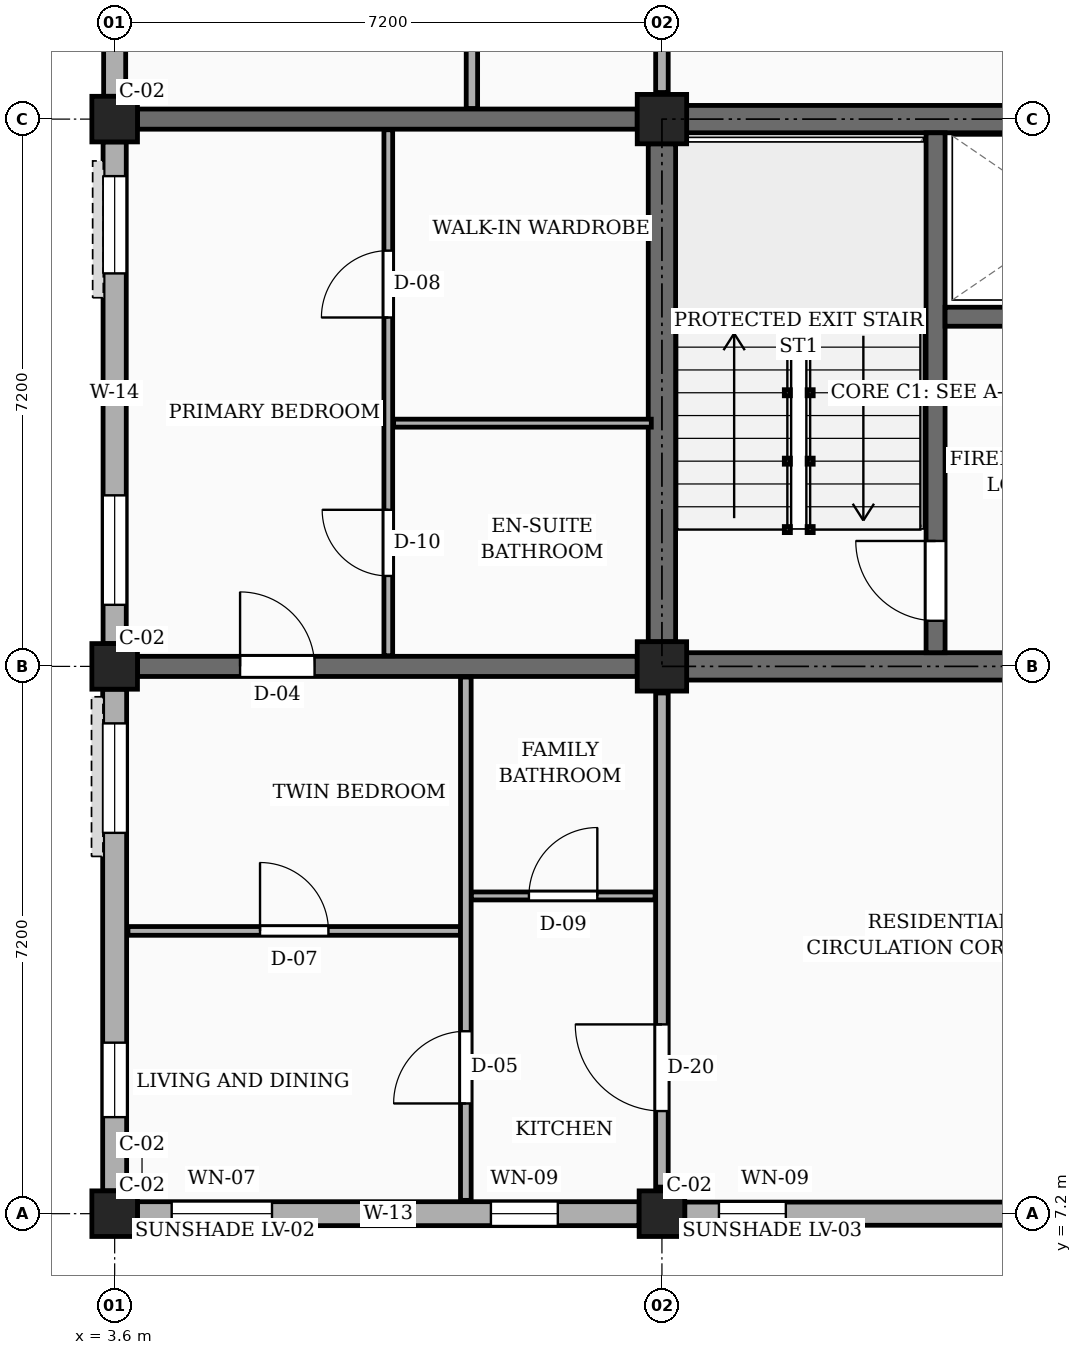
"""IFC4 building model, lengths in metres.
Left out: names, types, materials, properties, quantities, classifications, styles, units other than length and angle.
Written with IfcOpenShell. Run it as: python <this file> out.ifc"""

import sys

from ifc_helpers import new_model, si_unit, direction, frame, frame_2d, origin, origin_2d, place, context, subcontext, project, spatial, rectangle, extrude, element, fill, save


model = new_model("IFC4")
c1 = context("Model", 3, precision=1e-05, world=origin(), true_north=direction((0.0, 1.0)))
c2 = subcontext(c1, "Body", "Model", "MODEL_VIEW")
j1 = project(units=[si_unit("LENGTHUNIT", "METRE"), si_unit("PLANEANGLEUNIT", "RADIAN")], contexts=[c1])
p1 = place(None, origin())
s1 = spatial("IfcSite", under=j1, at=p1, CompositionType="ELEMENT")
p2 = place(p1, origin())
s2 = spatial("IfcBuilding", under=s1, at=p2, CompositionType="ELEMENT")
p3 = place(p2, frame((0.0, 0.0, 4.5)))
s3 = spatial("IfcBuildingStorey", under=s2, at=p3, CompositionType="ELEMENT", Elevation=4.5)
for number, where, z_axis, x_axis in (
    (1, (3.6, 7.2, 0.0), (0.0, 0.0, 1.0), (1.0, 0.0, 0.0)),
    (2, (3.6, 14.4, 0.0), (0.0, 0.0, 1.0), (1.0, 0.0, 0.0)),
    (3, (3.6, 21.6, 0.0), (0.0, 0.0, 1.0), (1.0, 0.0, 0.0)),
    (4, (10.8, 7.2, 0.0), (0.0, 0.0, 1.0), (1.0, 0.0, 0.0)),
):
    element("IfcColumn", number, at=place(p3, frame(where, z_axis=z_axis, x_axis=x_axis)), inside=s3, PredefinedType="COLUMN", context=c2, shape_type="SweptSolid", body=[
        extrude(rectangle(XDim=0.6, YDim=0.6, at=origin_2d()), origin(), (0.0, 0.0, 1.0), 3.15),
    ])
for number, where, z_axis, x_axis in (
    (5, (10.8, 14.4, 0.0), (0.0, 0.0, 1.0), (1.0, 0.0, 0.0)),
    (6, (10.8, 21.6, 0.0), (0.0, 0.0, 1.0), (1.0, 0.0, 0.0)),
):
    element("IfcColumn", number, at=place(p3, frame(where, z_axis=z_axis, x_axis=x_axis)), inside=s3, PredefinedType="COLUMN", context=c2, shape_type="SweptSolid", body=[
        extrude(rectangle(XDim=0.65, YDim=0.65, at=origin_2d()), origin(), (0.0, 0.0, 1.0), 3.15),
    ])
p4 = place(p3, frame((3.9, 14.4, 0.0), z_axis=(0.0, 0.0, 1.0), x_axis=(1.0, 0.0, 0.0)))
e7 = element("IfcWall", 7, at=p4, inside=s3, PredefinedType="SOLIDWALL", context=c2, shape_type="SweptSolid", body=[
    extrude(rectangle(XDim=6.575, YDim=0.265, at=frame_2d((3.288, 0.0))), origin(), (0.0, 0.0, 1.0), 2.17),
])
p5 = place(p4, frame((1.35, 0.0, 0.0)))
e8 = element("IfcOpeningElement", 8, at=p5, cuts=e7, PredefinedType="OPENING", context=c2, shape_type="SweptSolid", body=[
    extrude(rectangle(XDim=0.98, YDim=2.12, at=frame_2d((0.49, 1.06))), frame((0.0, 0.143, 0.0), z_axis=(0.0, -1.0, 0.0), x_axis=(1.0, 0.0, 0.0)), (0.0, 0.0, 1.0), 0.285),
])
p6 = place(p3, frame((3.9, 21.6, 0.0), z_axis=(0.0, 0.0, 1.0), x_axis=(1.0, 0.0, 0.0)))
e9 = element("IfcWall", 9, at=p6, inside=s3, PredefinedType="SOLIDWALL", context=c2, shape_type="SweptSolid", body=[
    extrude(rectangle(XDim=6.575, YDim=0.265, at=frame_2d((3.288, 0.0))), origin(), (0.0, 0.0, 1.0), 2.17),
])
p7 = place(p3, frame((3.9, 7.2, 0.0), z_axis=(0.0, 0.0, 1.0), x_axis=(1.0, 0.0, 0.0)))
e10 = element("IfcWall", 10, at=p7, inside=s3, PredefinedType="SOLIDWALL", context=c2, shape_type="SweptSolid", body=[
    extrude(rectangle(XDim=6.6, YDim=0.315, at=frame_2d((3.3, 0.0))), origin(), (0.0, 0.0, 1.0), 2.44),
])
p8 = place(p7, frame((0.45, 0.0, 0.78)))
e11 = element("IfcOpeningElement", 11, at=p8, cuts=e10, PredefinedType="OPENING", context=c2, shape_type="SweptSolid", body=[
    extrude(rectangle(XDim=1.32, YDim=1.15, at=frame_2d((0.66, 0.575))), frame((0.0, 0.167, 0.0), z_axis=(0.0, -1.0, 0.0), x_axis=(1.0, 0.0, 0.0)), (0.0, 0.0, 1.0), 0.335),
])
p9 = place(p7, frame((4.65, 0.0, 0.78)))
e12 = element("IfcOpeningElement", 12, at=p9, cuts=e10, PredefinedType="OPENING", context=c2, shape_type="SweptSolid", body=[
    extrude(rectangle(XDim=0.88, YDim=1.26, at=frame_2d((0.44, 0.63))), frame((0.0, 0.167, 0.0), z_axis=(0.0, -1.0, 0.0), x_axis=(1.0, 0.0, 0.0)), (0.0, 0.0, 1.0), 0.335),
])
p10 = place(p3, frame((11.1, 7.2, 0.0), z_axis=(0.0, 0.0, 1.0), x_axis=(1.0, 0.0, 0.0)))
e13 = element("IfcWall", 13, at=p10, inside=s3, PredefinedType="SOLIDWALL", context=c2, shape_type="SweptSolid", body=[
    extrude(rectangle(XDim=6.6, YDim=0.305, at=frame_2d((3.3, 0.0))), origin(), (0.0, 0.0, 1.0), 2.44),
])
p11 = place(p10, frame((0.45, 0.0, 0.78)))
e14 = element("IfcOpeningElement", 14, at=p11, cuts=e13, PredefinedType="OPENING", context=c2, shape_type="SweptSolid", body=[
    extrude(rectangle(XDim=0.88, YDim=1.26, at=frame_2d((0.44, 0.63))), frame((0.0, 0.163, 0.0), z_axis=(0.0, -1.0, 0.0), x_axis=(1.0, 0.0, 0.0)), (0.0, 0.0, 1.0), 0.325),
])
p12 = place(p10, frame((4.65, 0.0, 0.78)))
e15 = element("IfcOpeningElement", 15, at=p12, cuts=e13, PredefinedType="OPENING", context=c2, shape_type="SweptSolid", body=[
    extrude(rectangle(XDim=1.04, YDim=1.26, at=frame_2d((0.52, 0.63))), frame((0.0, 0.163, 0.0), z_axis=(0.0, -1.0, 0.0), x_axis=(1.0, 0.0, 0.0)), (0.0, 0.0, 1.0), 0.325),
])
p13 = place(p3, frame((3.6, 28.5, 0.0), z_axis=(0.0, 0.0, 1.0), x_axis=(0.0, -1.0, 0.0)))
e16 = element("IfcWall", 16, at=p13, inside=s3, PredefinedType="SOLIDWALL", context=c2, shape_type="SweptSolid", body=[
    extrude(rectangle(XDim=6.6, YDim=0.29, at=frame_2d((3.3, 0.0))), origin(), (0.0, 0.0, 1.0), 2.44),
])
p14 = place(p13, frame((0.45, 0.0, 0.78)))
e17 = element("IfcOpeningElement", 17, at=p14, cuts=e16, PredefinedType="OPENING", context=c2, shape_type="SweptSolid", body=[
    extrude(rectangle(XDim=1.12, YDim=1.26, at=frame_2d((0.56, 0.63))), frame((0.0, 0.155, 0.0), z_axis=(0.0, -1.0, 0.0), x_axis=(1.0, 0.0, 0.0)), (0.0, 0.0, 1.0), 0.31),
])
p15 = place(p13, frame((4.65, 0.0, 0.78)))
e18 = element("IfcOpeningElement", 18, at=p15, cuts=e16, PredefinedType="OPENING", context=c2, shape_type="SweptSolid", body=[
    extrude(rectangle(XDim=1.28, YDim=1.26, at=frame_2d((0.64, 0.63))), frame((0.0, 0.155, 0.0), z_axis=(0.0, -1.0, 0.0), x_axis=(1.0, 0.0, 0.0)), (0.0, 0.0, 1.0), 0.31),
])
p16 = place(p3, frame((3.6, 21.3, 0.0), z_axis=(0.0, 0.0, 1.0), x_axis=(0.0, -1.0, 0.0)))
e19 = element("IfcWall", 19, at=p16, inside=s3, PredefinedType="SOLIDWALL", context=c2, shape_type="SweptSolid", body=[
    extrude(rectangle(XDim=6.6, YDim=0.305, at=frame_2d((3.3, 0.0))), origin(), (0.0, 0.0, 1.0), 2.44),
])
p17 = place(p16, frame((0.45, 0.0, 0.78)))
e20 = element("IfcOpeningElement", 20, at=p17, cuts=e19, PredefinedType="OPENING", context=c2, shape_type="SweptSolid", body=[
    extrude(rectangle(XDim=1.28, YDim=1.26, at=frame_2d((0.64, 0.63))), frame((0.0, 0.163, 0.0), z_axis=(0.0, -1.0, 0.0), x_axis=(1.0, 0.0, 0.0)), (0.0, 0.0, 1.0), 0.325),
])
p18 = place(p16, frame((4.65, 0.0, 0.78)))
e21 = element("IfcOpeningElement", 21, at=p18, cuts=e19, PredefinedType="OPENING", context=c2, shape_type="SweptSolid", body=[
    extrude(rectangle(XDim=1.44, YDim=1.26, at=frame_2d((0.72, 0.63))), frame((0.0, 0.163, 0.0), z_axis=(0.0, -1.0, 0.0), x_axis=(1.0, 0.0, 0.0)), (0.0, 0.0, 1.0), 0.325),
])
p19 = place(p3, frame((3.6, 14.1, 0.0), z_axis=(0.0, 0.0, 1.0), x_axis=(0.0, -1.0, 0.0)))
e22 = element("IfcWall", 22, at=p19, inside=s3, PredefinedType="SOLIDWALL", context=c2, shape_type="SweptSolid", body=[
    extrude(rectangle(XDim=6.6, YDim=0.315, at=frame_2d((3.3, 0.0))), origin(), (0.0, 0.0, 1.0), 2.44),
])
p20 = place(p19, frame((0.45, 0.0, 0.78)))
e23 = element("IfcOpeningElement", 23, at=p20, cuts=e22, PredefinedType="OPENING", context=c2, shape_type="SweptSolid", body=[
    extrude(rectangle(XDim=1.44, YDim=1.26, at=frame_2d((0.72, 0.63))), frame((0.0, 0.167, 0.0), z_axis=(0.0, -1.0, 0.0), x_axis=(1.0, 0.0, 0.0)), (0.0, 0.0, 1.0), 0.335),
])
p21 = place(p19, frame((4.65, 0.0, 0.78)))
e24 = element("IfcOpeningElement", 24, at=p21, cuts=e22, PredefinedType="OPENING", context=c2, shape_type="SweptSolid", body=[
    extrude(rectangle(XDim=0.98, YDim=1.36, at=frame_2d((0.49, 0.68))), frame((0.0, 0.167, 0.0), z_axis=(0.0, -1.0, 0.0), x_axis=(1.0, 0.0, 0.0)), (0.0, 0.0, 1.0), 0.335),
])
p22 = place(p3, frame((10.8, 14.725, 0.0), z_axis=(0.0, 0.0, 1.0), x_axis=(0.0, 1.0, 0.0)))
e25 = element("IfcWall", 25, at=p22, inside=s3, PredefinedType="SHEAR", context=c2, shape_type="SweptSolid", body=[
    extrude(rectangle(XDim=6.55, YDim=0.36, at=frame_2d((3.275, 0.0))), origin(), (0.0, 0.0, 1.0), 2.87),
])
for number, where, z_axis, x_axis in (
    (26, (11.125, 21.6, 0.0), (0.0, 0.0, 1.0), (1.0, 0.0, 0.0)),
    (27, (11.125, 14.4, 0.0), (0.0, 0.0, 1.0), (1.0, 0.0, 0.0)),
):
    element("IfcWall", number, at=place(p3, frame(where, z_axis=z_axis, x_axis=x_axis)), inside=s3, PredefinedType="SHEAR", context=c2, shape_type="SweptSolid", body=[
        extrude(rectangle(XDim=6.55, YDim=0.36, at=frame_2d((3.275, 0.0))), origin(), (0.0, 0.0, 1.0), 2.87),
    ])
p23 = place(p3, frame((14.4, 14.58, 0.0), z_axis=(0.0, 0.0, 1.0), x_axis=(0.0, 1.0, 0.0)))
e28 = element("IfcWall", 28, at=p23, inside=s3, PredefinedType="SHEAR", context=c2, shape_type="SweptSolid", body=[
    extrude(rectangle(XDim=6.84, YDim=0.25, at=frame_2d((3.42, 0.0))), origin(), (0.0, 0.0, 1.0), 2.87),
])
p24 = place(p23, frame((0.42, 0.0, 0.0)))
e29 = element("IfcOpeningElement", 29, at=p24, cuts=e28, PredefinedType="OPENING", context=c2, shape_type="SweptSolid", body=[
    extrude(rectangle(XDim=1.05, YDim=2.15, at=frame_2d((0.525, 1.075))), frame((0.0, 0.135, 0.0), z_axis=(0.0, -1.0, 0.0), x_axis=(1.0, 0.0, 0.0)), (0.0, 0.0, 1.0), 0.27),
])
p25 = place(p3, frame((14.525, 19.0, 0.0), z_axis=(0.0, 0.0, 1.0), x_axis=(1.0, 0.0, 0.0)))
e30 = element("IfcWall", 30, at=p25, inside=s3, PredefinedType="SHEAR", context=c2, shape_type="SweptSolid", body=[
    extrude(rectangle(XDim=3.295, YDim=0.25, at=frame_2d((1.647, 0.0))), origin(), (0.0, 0.0, 1.0), 2.87),
])
p26 = place(p25, frame((1.1, 0.0, 0.0)))
e31 = element("IfcOpeningElement", 31, at=p26, cuts=e30, PredefinedType="OPENING", context=c2, shape_type="SweptSolid", body=[
    extrude(rectangle(XDim=1.1, YDim=2.2, at=frame_2d((0.55, 1.1))), frame((0.0, 0.135, 0.0), z_axis=(0.0, -1.0, 0.0), x_axis=(1.0, 0.0, 0.0)), (0.0, 0.0, 1.0), 0.27),
])
p27 = place(p3, frame((10.8, 7.55, 0.0), z_axis=(0.0, 0.0, 1.0), x_axis=(0.0, 1.0, 0.0)))
e32 = element("IfcWall", 32, at=p27, inside=s3, PredefinedType="PARTITIONING", context=c2, shape_type="SweptSolid", body=[
    extrude(rectangle(XDim=6.5, YDim=0.165, at=frame_2d((3.25, 0.0))), origin(), (0.0, 0.0, 1.0), 2.22),
])
p28 = place(p27, frame((1.0, 0.0, 0.0)))
e33 = element("IfcOpeningElement", 33, at=p28, cuts=e32, PredefinedType="OPENING", context=c2, shape_type="SweptSolid", body=[
    extrude(rectangle(XDim=1.14, YDim=2.18, at=frame_2d((0.57, 1.09))), frame((0.0, 0.093, 0.0), z_axis=(0.0, -1.0, 0.0), x_axis=(1.0, 0.0, 0.0)), (0.0, 0.0, 1.0), 0.185),
])
p29 = place(p3, frame((10.8, 21.95, 0.0), z_axis=(0.0, 0.0, 1.0), x_axis=(0.0, 1.0, 0.0)))
e34 = element("IfcWall", 34, at=p29, inside=s3, PredefinedType="PARTITIONING", context=c2, shape_type="SweptSolid", body=[
    extrude(rectangle(XDim=6.5, YDim=0.165, at=frame_2d((3.25, 0.0))), origin(), (0.0, 0.0, 1.0), 2.22),
])
p30 = place(p29, frame((1.0, 0.0, 0.0)))
e35 = element("IfcOpeningElement", 35, at=p30, cuts=e34, PredefinedType="OPENING", context=c2, shape_type="SweptSolid", body=[
    extrude(rectangle(XDim=1.0, YDim=2.15, at=frame_2d((0.5, 1.075))), frame((0.0, 0.093, 0.0), z_axis=(0.0, -1.0, 0.0), x_axis=(1.0, 0.0, 0.0)), (0.0, 0.0, 1.0), 0.185),
])
p31 = place(p3, frame((3.775, 10.92, 0.0), z_axis=(0.0, 0.0, 1.0), x_axis=(1.0, 0.0, 0.0)))
e36 = element("IfcWall", 36, at=p31, inside=s3, PredefinedType="PARTITIONING", context=c2, shape_type="SweptSolid", body=[
    extrude(rectangle(XDim=4.375, YDim=0.115, at=frame_2d((2.188, 0.0))), origin(), (0.0, 0.0, 1.0), 2.305),
])
p32 = place(p31, frame((1.738, 0.0, 0.0)))
e37 = element("IfcOpeningElement", 37, at=p32, cuts=e36, PredefinedType="OPENING", context=c2, shape_type="SweptSolid", body=[
    extrude(rectangle(XDim=0.9, YDim=2.1, at=frame_2d((0.45, 1.05))), frame((0.0, 0.067, 0.0), z_axis=(0.0, -1.0, 0.0), x_axis=(1.0, 0.0, 0.0)), (0.0, 0.0, 1.0), 0.135),
])
p33 = place(p3, frame((8.29, 11.38, 0.0), z_axis=(0.0, 0.0, 1.0), x_axis=(1.0, 0.0, 0.0)))
e38 = element("IfcWall", 38, at=p33, inside=s3, PredefinedType="PARTITIONING", context=c2, shape_type="SweptSolid", body=[
    extrude(rectangle(XDim=2.42, YDim=0.105, at=frame_2d((1.21, 0.0))), origin(), (0.0, 0.0, 1.0), 2.305),
])
p34 = place(p33, frame((0.76, 0.0, 0.0)))
e39 = element("IfcOpeningElement", 39, at=p34, cuts=e38, PredefinedType="OPENING", context=c2, shape_type="SweptSolid", body=[
    extrude(rectangle(XDim=0.9, YDim=2.05, at=frame_2d((0.45, 1.025))), frame((0.0, 0.062, 0.0), z_axis=(0.0, -1.0, 0.0), x_axis=(1.0, 0.0, 0.0)), (0.0, 0.0, 1.0), 0.125),
])
p35 = place(p3, frame((8.22, 7.375, 0.0), z_axis=(0.0, 0.0, 1.0), x_axis=(0.0, 1.0, 0.0)))
e40 = element("IfcWall", 40, at=p35, inside=s3, PredefinedType="PARTITIONING", context=c2, shape_type="SweptSolid", body=[
    extrude(rectangle(XDim=6.885, YDim=0.14, at=frame_2d((3.442, 0.0))), origin(), (0.0, 0.0, 1.0), 2.305),
])
p36 = place(p35, frame((1.275, 0.0, 0.0)))
e41 = element("IfcOpeningElement", 41, at=p36, cuts=e40, PredefinedType="OPENING", context=c2, shape_type="SweptSolid", body=[
    extrude(rectangle(XDim=0.95, YDim=2.1, at=frame_2d((0.475, 1.05))), frame((0.0, 0.08, 0.0), z_axis=(0.0, -1.0, 0.0), x_axis=(1.0, 0.0, 0.0)), (0.0, 0.0, 1.0), 0.16),
])
p37 = place(p3, frame((7.2, 14.54, 0.0), z_axis=(0.0, 0.0, 1.0), x_axis=(0.0, 1.0, 0.0)))
e42 = element("IfcWall", 42, at=p37, inside=s3, PredefinedType="PARTITIONING", context=c2, shape_type="SweptSolid", body=[
    extrude(rectangle(XDim=6.92, YDim=0.115, at=frame_2d((3.46, 0.0))), origin(), (0.0, 0.0, 1.0), 2.305),
])
p38 = place(p37, frame((1.05, 0.0, 0.0)))
e43 = element("IfcOpeningElement", 43, at=p38, cuts=e42, PredefinedType="OPENING", context=c2, shape_type="SweptSolid", body=[
    extrude(rectangle(XDim=0.87, YDim=2.05, at=frame_2d((0.435, 1.025))), frame((0.0, 0.067, 0.0), z_axis=(0.0, -1.0, 0.0), x_axis=(1.0, 0.0, 0.0)), (0.0, 0.0, 1.0), 0.135),
])
p39 = place(p37, frame((4.45, 0.0, 0.0)))
e44 = element("IfcOpeningElement", 44, at=p39, cuts=e42, PredefinedType="OPENING", context=c2, shape_type="SweptSolid", body=[
    extrude(rectangle(XDim=0.88, YDim=2.08, at=frame_2d((0.44, 1.04))), frame((0.0, 0.067, 0.0), z_axis=(0.0, -1.0, 0.0), x_axis=(1.0, 0.0, 0.0)), (0.0, 0.0, 1.0), 0.135),
])
p40 = place(p3, frame((7.27, 17.6, 0.0), z_axis=(0.0, 0.0, 1.0), x_axis=(1.0, 0.0, 0.0)))
e45 = element("IfcWall", 45, at=p40, inside=s3, PredefinedType="PARTITIONING", context=c2, shape_type="SweptSolid", body=[
    extrude(rectangle(XDim=3.39, YDim=0.105, at=frame_2d((1.695, 0.0))), origin(), (0.0, 0.0, 1.0), 2.305),
])
p41 = place(p3, frame((8.3, 21.74, 0.0), z_axis=(0.0, 0.0, 1.0), x_axis=(0.0, 1.0, 0.0)))
e46 = element("IfcWall", 46, at=p41, inside=s3, PredefinedType="PARTITIONING", context=c2, shape_type="SweptSolid", body=[
    extrude(rectangle(XDim=6.92, YDim=0.15, at=frame_2d((3.46, 0.0))), origin(), (0.0, 0.0, 1.0), 2.305),
])
p42 = place(p41, frame((1.31, 0.0, 0.0)))
e47 = element("IfcOpeningElement", 47, at=p42, cuts=e46, PredefinedType="OPENING", context=c2, shape_type="SweptSolid", body=[
    extrude(rectangle(XDim=0.95, YDim=2.1, at=frame_2d((0.475, 1.05))), frame((0.0, 0.085, 0.0), z_axis=(0.0, -1.0, 0.0), x_axis=(1.0, 0.0, 0.0)), (0.0, 0.0, 1.0), 0.17),
])
p43 = place(p8, origin())
e48 = element("IfcWindow", 48, at=p43, inside=s3, PartitioningType="SINGLE_PANEL", PredefinedType="WINDOW", context=c2, shape_type="SweptSolid", body=[
    extrude(rectangle(XDim=1.32, YDim=1.15, at=frame_2d((0.66, 0.575))), frame((0.0, 0.03, 0.0), z_axis=(0.0, -1.0, 0.0), x_axis=(1.0, 0.0, 0.0)), (0.0, 0.0, 1.0), 0.06),
])
fill(e11, e48)
p44 = place(p9, origin())
e49 = element("IfcWindow", 49, at=p44, inside=s3, PartitioningType="SINGLE_PANEL", PredefinedType="WINDOW", context=c2, shape_type="SweptSolid", body=[
    extrude(rectangle(XDim=0.88, YDim=1.26, at=frame_2d((0.44, 0.63))), frame((0.0, 0.03, 0.0), z_axis=(0.0, -1.0, 0.0), x_axis=(1.0, 0.0, 0.0)), (0.0, 0.0, 1.0), 0.06),
])
fill(e12, e49)
p45 = place(p11, origin())
e50 = element("IfcWindow", 50, at=p45, inside=s3, PartitioningType="SINGLE_PANEL", PredefinedType="WINDOW", context=c2, shape_type="SweptSolid", body=[
    extrude(rectangle(XDim=0.88, YDim=1.26, at=frame_2d((0.44, 0.63))), frame((0.0, 0.03, 0.0), z_axis=(0.0, -1.0, 0.0), x_axis=(1.0, 0.0, 0.0)), (0.0, 0.0, 1.0), 0.06),
])
fill(e14, e50)
p46 = place(p17, origin())
e51 = element("IfcWindow", 51, at=p46, inside=s3, PartitioningType="SINGLE_PANEL", PredefinedType="WINDOW", context=c2, shape_type="SweptSolid", body=[
    extrude(rectangle(XDim=1.28, YDim=1.26, at=frame_2d((0.64, 0.63))), frame((0.0, 0.03, 0.0), z_axis=(0.0, -1.0, 0.0), x_axis=(1.0, 0.0, 0.0)), (0.0, 0.0, 1.0), 0.06),
])
fill(e20, e51)
p47 = place(p18, origin())
e52 = element("IfcWindow", 52, at=p47, inside=s3, PartitioningType="SINGLE_PANEL", PredefinedType="WINDOW", context=c2, shape_type="SweptSolid", body=[
    extrude(rectangle(XDim=1.44, YDim=1.26, at=frame_2d((0.72, 0.63))), frame((0.0, 0.03, 0.0), z_axis=(0.0, -1.0, 0.0), x_axis=(1.0, 0.0, 0.0)), (0.0, 0.0, 1.0), 0.06),
])
fill(e21, e52)
p48 = place(p20, origin())
e53 = element("IfcWindow", 53, at=p48, inside=s3, PartitioningType="SINGLE_PANEL", PredefinedType="WINDOW", context=c2, shape_type="SweptSolid", body=[
    extrude(rectangle(XDim=1.44, YDim=1.26, at=frame_2d((0.72, 0.63))), frame((0.0, 0.03, 0.0), z_axis=(0.0, -1.0, 0.0), x_axis=(1.0, 0.0, 0.0)), (0.0, 0.0, 1.0), 0.06),
])
fill(e23, e53)
p49 = place(p21, origin())
e54 = element("IfcWindow", 54, at=p49, inside=s3, PartitioningType="SINGLE_PANEL", PredefinedType="WINDOW", context=c2, shape_type="SweptSolid", body=[
    extrude(rectangle(XDim=0.98, YDim=1.36, at=frame_2d((0.49, 0.68))), frame((0.0, 0.03, 0.0), z_axis=(0.0, -1.0, 0.0), x_axis=(1.0, 0.0, 0.0)), (0.0, 0.0, 1.0), 0.06),
])
fill(e24, e54)
p50 = place(p24, origin())
e55 = element("IfcDoor", 55, at=p50, inside=s3, OperationType="SINGLE_SWING_RIGHT", PredefinedType="DOOR", context=c2, shape_type="SweptSolid", body=[
    extrude(rectangle(XDim=1.05, YDim=2.15, at=frame_2d((0.525, 1.075))), frame((0.0, 0.025, 0.0), z_axis=(0.0, -1.0, 0.0), x_axis=(1.0, 0.0, 0.0)), (0.0, 0.0, 1.0), 0.05),
])
fill(e29, e55)
p51 = place(p28, origin())
e56 = element("IfcDoor", 56, at=p51, inside=s3, OperationType="SINGLE_SWING_RIGHT", PredefinedType="DOOR", context=c2, shape_type="SweptSolid", body=[
    extrude(rectangle(XDim=1.14, YDim=2.18, at=frame_2d((0.57, 1.09))), frame((0.0, 0.025, 0.0), z_axis=(0.0, -1.0, 0.0), x_axis=(1.0, 0.0, 0.0)), (0.0, 0.0, 1.0), 0.05),
])
fill(e33, e56)
p52 = place(p32, origin())
e57 = element("IfcDoor", 57, at=p52, inside=s3, OperationType="SINGLE_SWING_LEFT", PredefinedType="DOOR", context=c2, shape_type="SweptSolid", body=[
    extrude(rectangle(XDim=0.9, YDim=2.1, at=frame_2d((0.45, 1.05))), frame((0.0, 0.025, 0.0), z_axis=(0.0, -1.0, 0.0), x_axis=(1.0, 0.0, 0.0)), (0.0, 0.0, 1.0), 0.05),
])
fill(e37, e57)
p53 = place(p34, origin())
e58 = element("IfcDoor", 58, at=p53, inside=s3, OperationType="SINGLE_SWING_RIGHT", PredefinedType="DOOR", context=c2, shape_type="SweptSolid", body=[
    extrude(rectangle(XDim=0.9, YDim=2.05, at=frame_2d((0.45, 1.025))), frame((0.0, 0.025, 0.0), z_axis=(0.0, -1.0, 0.0), x_axis=(1.0, 0.0, 0.0)), (0.0, 0.0, 1.0), 0.05),
])
fill(e39, e58)
p54 = place(p36, origin())
e59 = element("IfcDoor", 59, at=p54, inside=s3, OperationType="SINGLE_SWING_LEFT", PredefinedType="DOOR", context=c2, shape_type="SweptSolid", body=[
    extrude(rectangle(XDim=0.95, YDim=2.1, at=frame_2d((0.475, 1.05))), frame((0.0, 0.025, 0.0), z_axis=(0.0, -1.0, 0.0), x_axis=(1.0, 0.0, 0.0)), (0.0, 0.0, 1.0), 0.05),
])
fill(e41, e59)
p55 = place(p38, origin())
e60 = element("IfcDoor", 60, at=p55, inside=s3, OperationType="SINGLE_SWING_RIGHT", PredefinedType="DOOR", context=c2, shape_type="SweptSolid", body=[
    extrude(rectangle(XDim=0.87, YDim=2.05, at=frame_2d((0.435, 1.025))), frame((0.0, 0.025, 0.0), z_axis=(0.0, -1.0, 0.0), x_axis=(1.0, 0.0, 0.0)), (0.0, 0.0, 1.0), 0.05),
])
fill(e43, e60)
p56 = place(p39, origin())
e61 = element("IfcDoor", 61, at=p56, inside=s3, OperationType="SINGLE_SWING_LEFT", PredefinedType="DOOR", context=c2, shape_type="SweptSolid", body=[
    extrude(rectangle(XDim=0.88, YDim=2.08, at=frame_2d((0.44, 1.04))), frame((0.0, 0.025, 0.0), z_axis=(0.0, -1.0, 0.0), x_axis=(1.0, 0.0, 0.0)), (0.0, 0.0, 1.0), 0.05),
])
fill(e44, e61)
p57 = place(p5, origin())
e62 = element("IfcDoor", 62, at=p57, inside=s3, OperationType="SINGLE_SWING_LEFT", PredefinedType="DOOR", context=c2, shape_type="SweptSolid", body=[
    extrude(rectangle(XDim=0.98, YDim=2.12, at=frame_2d((0.49, 1.06))), frame((0.0, 0.025, 0.0), z_axis=(0.0, -1.0, 0.0), x_axis=(1.0, 0.0, 0.0)), (0.0, 0.0, 1.0), 0.05),
])
fill(e8, e62)
save(model, sys.argv[1])
